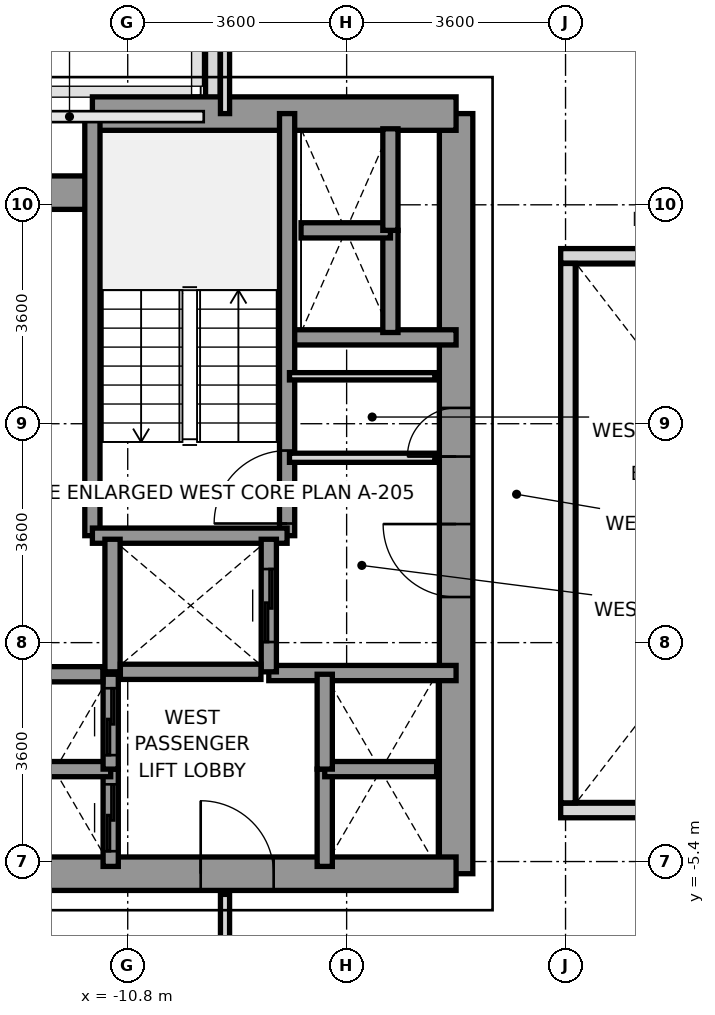
"""IFC4 building model, lengths in metres.
Left out: names, types, materials, properties, quantities, classifications, styles, units other than length and angle.
Written with IfcOpenShell. Run it as: python <this file> out.ifc"""

import sys

from ifc_helpers import new_model, si_unit, direction, frame, frame_2d, origin, place, context, subcontext, project, spatial, rectangle, extrude, source, transform, mapped, element, fill, save


model = new_model("IFC4")
c1 = context("Model", 3, precision=1e-05, world=origin(), true_north=direction((0.0, 1.0)))
c2 = subcontext(c1, "Body", "Model", "MODEL_VIEW")
j1 = project(units=[si_unit("LENGTHUNIT", "METRE"), si_unit("PLANEANGLEUNIT", "RADIAN")], contexts=[c1])
p1 = place(None, origin())
s1 = spatial("IfcSite", under=j1, at=p1, CompositionType="ELEMENT")
p2 = place(p1, origin())
s2 = spatial("IfcBuilding", under=s1, at=p2, CompositionType="ELEMENT")
p3 = place(p2, frame((0.0, 0.0, 57.8)))
s3 = spatial("IfcBuildingStorey", under=s2, at=p3, CompositionType="ELEMENT", Elevation=57.8)
p4 = place(p3, frame((-9.4, 6.953, 0.0), z_axis=(0.0, 0.0, 1.0), x_axis=(0.0, 1.0, 0.0)))
e1 = element("IfcWall", 1, at=p4, inside=s3, PredefinedType="PARAPET", context=c2, shape_type="SweptSolid", body=[
    extrude(rectangle(XDim=1.444, YDim=0.24, at=frame_2d((0.722, 0.0))), origin(), (0.0, 0.0, 1.0), 1.15),
])
p5 = place(p3, frame((-5.4, -5.6, 0.0), z_axis=(0.0, 0.0, 1.0), x_axis=(0.0, 1.0, 0.0)))
e2 = element("IfcWall", 2, at=p5, inside=s3, PredefinedType="SHEAR", context=c2, shape_type="SweptSolid", body=[
    extrude(rectangle(XDim=12.5, YDim=0.55, at=frame_2d((6.25, 0.0))), origin(), (0.0, 0.0, 1.0), 3.2),
])
p6 = place(p5, frame((4.55, 0.0, 0.0)))
e3 = element("IfcOpeningElement", 3, at=p6, cuts=e2, PredefinedType="OPENING", context=c2, shape_type="SweptSolid", body=[
    extrude(rectangle(XDim=1.2, YDim=2.2, at=frame_2d((0.6, 1.1))), frame((0.0, 0.285, 0.0), z_axis=(0.0, -1.0, 0.0), x_axis=(1.0, 0.0, 0.0)), (0.0, 0.0, 1.0), 0.57),
])
p7 = place(p5, frame((6.86, 0.0, 0.0)))
e4 = element("IfcOpeningElement", 4, at=p7, cuts=e2, PredefinedType="OPENING", context=c2, shape_type="SweptSolid", body=[
    extrude(rectangle(XDim=0.8, YDim=2.1, at=frame_2d((0.4, 1.05))), frame((0.0, 0.285, 0.0), z_axis=(0.0, -1.0, 0.0), x_axis=(1.0, 0.0, 0.0)), (0.0, 0.0, 1.0), 0.57),
])
p8 = place(p3, frame((-11.381, 6.9, 0.0), z_axis=(0.0, 0.0, 1.0), x_axis=(1.0, 0.0, 0.0)))
e5 = element("IfcWall", 5, at=p8, inside=s3, PredefinedType="SHEAR", context=c2, shape_type="SweptSolid", body=[
    extrude(rectangle(XDim=5.981, YDim=0.55, at=frame_2d((2.991, 0.0))), origin(), (0.0, 0.0, 1.0), 3.2),
])
p9 = place(p3, frame((-13.2, 5.6, 0.0), z_axis=(0.0, 0.0, 1.0), x_axis=(1.0, 0.0, 0.0)))
e6 = element("IfcWall", 6, at=p9, inside=s3, PredefinedType="SHEAR", context=c2, shape_type="SweptSolid", body=[
    extrude(rectangle(XDim=1.819, YDim=0.55, at=frame_2d((0.909, 0.0))), origin(), (0.0, 0.0, 1.0), 3.2),
])
p10 = place(p3, frame((-13.2, -5.6, 0.0), z_axis=(0.0, 0.0, 1.0), x_axis=(1.0, 0.0, 0.0)))
e7 = element("IfcWall", 7, at=p10, inside=s3, PredefinedType="SHEAR", context=c2, shape_type="SweptSolid", body=[
    extrude(rectangle(XDim=7.8, YDim=0.55, at=frame_2d((3.9, 0.0))), origin(), (0.0, 0.0, 1.0), 3.2),
])
p11 = place(p10, frame((3.6, 0.0, 0.0)))
e8 = element("IfcOpeningElement", 8, at=p11, cuts=e7, PredefinedType="OPENING", context=c2, shape_type="SweptSolid", body=[
    extrude(rectangle(XDim=1.2, YDim=2.2, at=frame_2d((0.6, 1.1))), frame((0.0, 0.285, 0.0), z_axis=(0.0, -1.0, 0.0), x_axis=(1.0, 0.0, 0.0)), (0.0, 0.0, 1.0), 0.57),
])
p12 = place(p3, frame((-8.18, 3.22, 0.0), z_axis=(0.0, 0.0, 1.0), x_axis=(1.0, 0.0, 0.0)))
e9 = element("IfcWall", 9, at=p12, inside=s3, PredefinedType="SOLIDWALL", context=c2, shape_type="SweptSolid", body=[
    extrude(rectangle(XDim=2.78, YDim=0.25, at=frame_2d((1.39, 0.0))), origin(), (0.0, 0.0, 1.0), 3.2),
])
p13 = place(p3, frame((-8.48, -2.3, 0.0), z_axis=(0.0, 0.0, 1.0), x_axis=(1.0, 0.0, 0.0)))
e10 = element("IfcWall", 10, at=p13, inside=s3, PredefinedType="SOLIDWALL", context=c2, shape_type="SweptSolid", body=[
    extrude(rectangle(XDim=3.08, YDim=0.25, at=frame_2d((1.54, 0.0))), origin(), (0.0, 0.0, 1.0), 3.2),
])
p14 = place(p3, frame((-8.179, -0.041, 0.0), z_axis=(0.0, 0.0, 1.0), x_axis=(0.0, 1.0, 0.0)))
e11 = element("IfcWall", 11, at=p14, inside=s3, PredefinedType="SOLIDWALL", context=c2, shape_type="SweptSolid", body=[
    extrude(rectangle(XDim=6.941, YDim=0.25, at=frame_2d((3.47, 0.0))), origin(), (0.0, 0.0, 1.0), 3.2),
])
p15 = place(p14, frame((0.2, 0.0, 0.0)))
e12 = element("IfcOpeningElement", 12, at=p15, cuts=e11, PredefinedType="OPENING", context=c2, shape_type="SweptSolid", body=[
    extrude(rectangle(XDim=1.2, YDim=2.2, at=frame_2d((0.6, 1.1))), frame((0.0, 0.135, 0.0), z_axis=(0.0, -1.0, 0.0), x_axis=(1.0, 0.0, 0.0)), (0.0, 0.0, 1.0), 0.27),
])
p16 = place(p3, frame((-11.381, -0.041, 0.0), z_axis=(0.0, 0.0, 1.0), x_axis=(0.0, 1.0, 0.0)))
e13 = element("IfcWall", 13, at=p16, inside=s3, PredefinedType="SOLIDWALL", context=c2, shape_type="SweptSolid", body=[
    extrude(rectangle(XDim=6.941, YDim=0.25, at=frame_2d((3.47, 0.0))), origin(), (0.0, 0.0, 1.0), 3.2),
])
p17 = place(p3, frame((-11.381, -0.041, 0.0), z_axis=(0.0, 0.0, 1.0), x_axis=(1.0, 0.0, 0.0)))
e14 = element("IfcWall", 14, at=p17, inside=s3, PredefinedType="SOLIDWALL", context=c2, shape_type="SweptSolid", body=[
    extrude(rectangle(XDim=3.202, YDim=0.25, at=frame_2d((1.601, 0.0))), origin(), (0.0, 0.0, 1.0), 3.2),
])
p18 = place(p3, frame((-11.05, -2.28, 0.0), z_axis=(0.0, 0.0, 1.0), x_axis=(0.0, 1.0, 0.0)))
e15 = element("IfcWall", 15, at=p18, inside=s3, PredefinedType="SOLIDWALL", context=c2, shape_type="SweptSolid", body=[
    extrude(rectangle(XDim=2.18, YDim=0.25, at=frame_2d((1.09, 0.0))), origin(), (0.0, 0.0, 1.0), 3.2),
])
p19 = place(p3, frame((-8.48, -2.28, 0.0), z_axis=(0.0, 0.0, 1.0), x_axis=(0.0, 1.0, 0.0)))
e16 = element("IfcWall", 16, at=p19, inside=s3, PredefinedType="SOLIDWALL", context=c2, shape_type="SweptSolid", body=[
    extrude(rectangle(XDim=2.18, YDim=0.25, at=frame_2d((1.09, 0.0))), origin(), (0.0, 0.0, 1.0), 3.2),
])
p20 = place(p19, frame((0.49, 0.0, 0.0)))
e17 = element("IfcOpeningElement", 17, at=p20, cuts=e16, PredefinedType="OPENING", context=c2, shape_type="SweptSolid", body=[
    extrude(rectangle(XDim=1.2, YDim=2.2, at=frame_2d((0.6, 1.1))), frame((0.0, 0.135, 0.0), z_axis=(0.0, -1.0, 0.0), x_axis=(1.0, 0.0, 0.0)), (0.0, 0.0, 1.0), 0.27),
])
p21 = place(p3, frame((-10.921, -2.28, 0.0), z_axis=(0.0, 0.0, 1.0), x_axis=(1.0, 0.0, 0.0)))
e18 = element("IfcWall", 18, at=p21, inside=s3, PredefinedType="SOLIDWALL", context=c2, shape_type="SweptSolid", body=[
    extrude(rectangle(XDim=2.312, YDim=0.25, at=frame_2d((1.156, 0.0))), origin(), (0.0, 0.0, 1.0), 3.2),
])
p22 = place(p3, frame((-11.08, -5.48, 0.0), z_axis=(0.0, 0.0, 1.0), x_axis=(0.0, 1.0, 0.0)))
e19 = element("IfcWall", 19, at=p22, inside=s3, PredefinedType="SOLIDWALL", context=c2, shape_type="SweptSolid", body=[
    extrude(rectangle(XDim=1.6, YDim=0.25, at=frame_2d((0.8, 0.0))), origin(), (0.0, 0.0, 1.0), 3.2),
])
p23 = place(p22, frame((0.25, 0.0, 0.0)))
e20 = element("IfcOpeningElement", 20, at=p23, cuts=e19, PredefinedType="OPENING", context=c2, shape_type="SweptSolid", body=[
    extrude(rectangle(XDim=1.1, YDim=2.2, at=frame_2d((0.55, 1.1))), frame((0.0, 0.135, 0.0), z_axis=(0.0, -1.0, 0.0), x_axis=(1.0, 0.0, 0.0)), (0.0, 0.0, 1.0), 0.27),
])
p24 = place(p3, frame((-12.92, -3.88, 0.0), z_axis=(0.0, 0.0, 1.0), x_axis=(1.0, 0.0, 0.0)))
e21 = element("IfcWall", 21, at=p24, inside=s3, PredefinedType="SOLIDWALL", context=c2, shape_type="SweptSolid", body=[
    extrude(rectangle(XDim=1.84, YDim=0.25, at=frame_2d((0.92, 0.0))), origin(), (0.0, 0.0, 1.0), 3.2),
])
p25 = place(p3, frame((-11.08, -3.88, 0.0), z_axis=(0.0, 0.0, 1.0), x_axis=(0.0, 1.0, 0.0)))
e22 = element("IfcWall", 22, at=p25, inside=s3, PredefinedType="SOLIDWALL", context=c2, shape_type="SweptSolid", body=[
    extrude(rectangle(XDim=1.56, YDim=0.25, at=frame_2d((0.78, 0.0))), origin(), (0.0, 0.0, 1.0), 3.2),
])
p26 = place(p25, frame((0.23, 0.0, 0.0)))
e23 = element("IfcOpeningElement", 23, at=p26, cuts=e22, PredefinedType="OPENING", context=c2, shape_type="SweptSolid", body=[
    extrude(rectangle(XDim=1.1, YDim=2.2, at=frame_2d((0.55, 1.1))), frame((0.0, 0.135, 0.0), z_axis=(0.0, -1.0, 0.0), x_axis=(1.0, 0.0, 0.0)), (0.0, 0.0, 1.0), 0.27),
])
p27 = place(p3, frame((-12.791, -2.32, 0.0), z_axis=(0.0, 0.0, 1.0), x_axis=(1.0, 0.0, 0.0)))
e24 = element("IfcWall", 24, at=p27, inside=s3, PredefinedType="SOLIDWALL", context=c2, shape_type="SweptSolid", body=[
    extrude(rectangle(XDim=1.582, YDim=0.25, at=frame_2d((0.791, 0.0))), origin(), (0.0, 0.0, 1.0), 3.2),
])
p28 = place(p3, frame((-7.56, -5.48, 0.0), z_axis=(0.0, 0.0, 1.0), x_axis=(0.0, 1.0, 0.0)))
e25 = element("IfcWall", 25, at=p28, inside=s3, PredefinedType="SOLIDWALL", context=c2, shape_type="SweptSolid", body=[
    extrude(rectangle(XDim=1.6, YDim=0.25, at=frame_2d((0.8, 0.0))), origin(), (0.0, 0.0, 1.0), 3.2),
])
p29 = place(p3, frame((-7.56, -3.88, 0.0), z_axis=(0.0, 0.0, 1.0), x_axis=(1.0, 0.0, 0.0)))
e26 = element("IfcWall", 26, at=p29, inside=s3, PredefinedType="SOLIDWALL", context=c2, shape_type="SweptSolid", body=[
    extrude(rectangle(XDim=1.84, YDim=0.25, at=frame_2d((0.92, 0.0))), origin(), (0.0, 0.0, 1.0), 3.2),
])
p30 = place(p3, frame((-7.56, -3.88, 0.0), z_axis=(0.0, 0.0, 1.0), x_axis=(0.0, 1.0, 0.0)))
e27 = element("IfcWall", 27, at=p30, inside=s3, PredefinedType="SOLIDWALL", context=c2, shape_type="SweptSolid", body=[
    extrude(rectangle(XDim=1.56, YDim=0.25, at=frame_2d((0.78, 0.0))), origin(), (0.0, 0.0, 1.0), 3.2),
])
p31 = place(p3, frame((-6.48, 3.3, 0.0), z_axis=(0.0, 0.0, 1.0), x_axis=(0.0, 1.0, 0.0)))
e28 = element("IfcWall", 28, at=p31, inside=s3, PredefinedType="SOLIDWALL", context=c2, shape_type="SweptSolid", body=[
    extrude(rectangle(XDim=1.68, YDim=0.25, at=frame_2d((0.84, 0.0))), origin(), (0.0, 0.0, 1.0), 3.2),
])
p32 = place(p3, frame((-7.95, 4.98, 0.0), z_axis=(0.0, 0.0, 1.0), x_axis=(1.0, 0.0, 0.0)))
e29 = element("IfcWall", 29, at=p32, inside=s3, PredefinedType="SOLIDWALL", context=c2, shape_type="SweptSolid", body=[
    extrude(rectangle(XDim=1.47, YDim=0.25, at=frame_2d((0.735, 0.0))), origin(), (0.0, 0.0, 1.0), 3.2),
])
p33 = place(p3, frame((-6.48, 4.98, 0.0), z_axis=(0.0, 0.0, 1.0), x_axis=(0.0, 1.0, 0.0)))
e30 = element("IfcWall", 30, at=p33, inside=s3, PredefinedType="SOLIDWALL", context=c2, shape_type="SweptSolid", body=[
    extrude(rectangle(XDim=1.67, YDim=0.25, at=frame_2d((0.835, 0.0))), origin(), (0.0, 0.0, 1.0), 3.2),
])
p34 = place(p3, frame((-8.14, 1.24, 0.0), z_axis=(0.0, 0.0, 1.0), x_axis=(1.0, 0.0, 0.0)))
e31 = element("IfcWall", 31, at=p34, inside=s3, PredefinedType="PARTITIONING", context=c2, shape_type="SweptSolid", body=[
    extrude(rectangle(XDim=2.39, YDim=0.15, at=frame_2d((1.195, 0.0))), origin(), (0.0, 0.0, 1.0), 2.3),
])
p35 = place(p3, frame((-8.14, 2.58, 0.0), z_axis=(0.0, 0.0, 1.0), x_axis=(1.0, 0.0, 0.0)))
e32 = element("IfcWall", 32, at=p35, inside=s3, PredefinedType="PARTITIONING", context=c2, shape_type="SweptSolid", body=[
    extrude(rectangle(XDim=2.39, YDim=0.12, at=frame_2d((1.195, 0.0))), origin(), (0.0, 0.0, 1.0), 2.3),
])
p36 = place(p3, frame((-9.2, 6.9, 0.0), z_axis=(0.0, 0.0, 1.0), x_axis=(0.0, 1.0, 0.0)))
e33 = element("IfcWall", 33, at=p36, inside=s3, PredefinedType="PARTITIONING", context=c2, shape_type="SweptSolid", body=[
    extrude(rectangle(XDim=8.78, YDim=0.15, at=frame_2d((4.39, 0.0))), origin(), (0.0, 0.0, 1.0), 2.65),
])
p37 = place(p3, frame((-9.2, -15.68, 0.0), z_axis=(0.0, 0.0, 1.0), x_axis=(0.0, 1.0, 0.0)))
e34 = element("IfcWall", 34, at=p37, inside=s3, PredefinedType="PARTITIONING", context=c2, shape_type="SweptSolid", body=[
    extrude(rectangle(XDim=9.74, YDim=0.15, at=frame_2d((4.87, 0.0))), origin(), (0.0, 0.0, 1.0), 2.65),
])
for number, where, z_axis, x_axis in (
    (35, (-3.68, -4.56, 0.0), (0.0, 0.0, 1.0), (1.0, 0.0, 0.0)),
    (36, (-3.68, 4.56, 0.0), (0.0, 0.0, 1.0), (1.0, 0.0, 0.0)),
):
    element("IfcWall", number, at=place(p3, frame(where, z_axis=z_axis, x_axis=x_axis)), inside=s3, PredefinedType="PARAPET", context=c2, shape_type="SweptSolid", body=[
        extrude(rectangle(XDim=7.36, YDim=0.24, at=frame_2d((3.68, 0.0))), origin(), (0.0, 0.0, 1.0), 1.15),
    ])
p38 = place(p3, frame((-3.56, -4.435, 0.0), z_axis=(0.0, 0.0, 1.0), x_axis=(0.0, 1.0, 0.0)))
e37 = element("IfcWall", 37, at=p38, inside=s3, PredefinedType="PARAPET", context=c2, shape_type="SweptSolid", body=[
    extrude(rectangle(XDim=8.87, YDim=0.24, at=frame_2d((4.435, 0.0))), origin(), (0.0, 0.0, 1.0), 1.15),
])
m1 = source(origin(), c2, "Body", "SweptSolid", [
    extrude(rectangle(XDim=1.2, YDim=2.2, at=frame_2d((0.6, 1.1))), frame((0.0, 0.025, 0.0), z_axis=(0.0, -1.0, 0.0), x_axis=(1.0, 0.0, 0.0)), (0.0, 0.0, 1.0), 0.05),
])
p39 = place(p15, origin())
e38 = element("IfcDoor", 38, at=p39, inside=s3, OperationType="SINGLE_SWING_LEFT", PredefinedType="DOOR", context=c2, shape_type="MappedRepresentation", body=[
    mapped(m1, transform((0.0, 0.0, 0.0), x_axis=(1.0, 0.0, 0.0), y_axis=(0.0, 1.0, 0.0), z_axis=(0.0, 0.0, 1.0), scale=1.0)),
])
fill(e12, e38)
p40 = place(p6, origin())
e39 = element("IfcDoor", 39, at=p40, inside=s3, OperationType="SINGLE_SWING_RIGHT", PredefinedType="DOOR", context=c2, shape_type="MappedRepresentation", body=[
    mapped(m1, transform((0.0, 0.0, 0.0), x_axis=(1.0, 0.0, 0.0), y_axis=(0.0, 1.0, 0.0), z_axis=(0.0, 0.0, 1.0), scale=1.0)),
])
fill(e3, e39)
p41 = place(p11, origin())
e40 = element("IfcDoor", 40, at=p41, inside=s3, OperationType="SINGLE_SWING_LEFT", PredefinedType="DOOR", context=c2, shape_type="MappedRepresentation", body=[
    mapped(m1, transform((0.0, 0.0, 0.0), x_axis=(1.0, 0.0, 0.0), y_axis=(0.0, 1.0, 0.0), z_axis=(0.0, 0.0, 1.0), scale=1.0)),
])
fill(e8, e40)
m2 = source(origin(), c2, "Body", "SweptSolid", [
    extrude(rectangle(XDim=0.8, YDim=2.1, at=frame_2d((0.4, 1.05))), frame((0.0, 0.025, 0.0), z_axis=(0.0, -1.0, 0.0), x_axis=(1.0, 0.0, 0.0)), (0.0, 0.0, 1.0), 0.05),
])
p42 = place(p7, origin())
e41 = element("IfcDoor", 41, at=p42, inside=s3, OperationType="SINGLE_SWING_LEFT", PredefinedType="DOOR", context=c2, shape_type="MappedRepresentation", body=[
    mapped(m2, transform((0.0, 0.0, 0.0), x_axis=(1.0, 0.0, 0.0), y_axis=(0.0, 1.0, 0.0), z_axis=(0.0, 0.0, 1.0), scale=1.0)),
])
fill(e4, e41)
p43 = place(p20, origin())
e42 = element("IfcDoor", 42, at=p43, inside=s3, OperationType="SLIDING_TO_RIGHT", PredefinedType="DOOR", context=c2, shape_type="MappedRepresentation", body=[
    mapped(m1, transform((0.0, 0.0, 0.0), x_axis=(1.0, 0.0, 0.0), y_axis=(0.0, 1.0, 0.0), z_axis=(0.0, 0.0, 1.0), scale=1.0)),
])
fill(e17, e42)
m3 = source(origin(), c2, "Body", "SweptSolid", [
    extrude(rectangle(XDim=1.1, YDim=2.2, at=frame_2d((0.55, 1.1))), frame((0.0, 0.025, 0.0), z_axis=(0.0, -1.0, 0.0), x_axis=(1.0, 0.0, 0.0)), (0.0, 0.0, 1.0), 0.05),
])
p44 = place(p23, origin())
e43 = element("IfcDoor", 43, at=p44, inside=s3, OperationType="SLIDING_TO_LEFT", PredefinedType="DOOR", context=c2, shape_type="MappedRepresentation", body=[
    mapped(m3, transform((0.0, 0.0, 0.0), x_axis=(1.0, 0.0, 0.0), y_axis=(0.0, 1.0, 0.0), z_axis=(0.0, 0.0, 1.0), scale=1.0)),
])
fill(e20, e43)
p45 = place(p26, origin())
e44 = element("IfcDoor", 44, at=p45, inside=s3, OperationType="SLIDING_TO_LEFT", PredefinedType="DOOR", context=c2, shape_type="MappedRepresentation", body=[
    mapped(m3, transform((0.0, 0.0, 0.0), x_axis=(1.0, 0.0, 0.0), y_axis=(0.0, 1.0, 0.0), z_axis=(0.0, 0.0, 1.0), scale=1.0)),
])
fill(e23, e44)
save(model, sys.argv[1])
